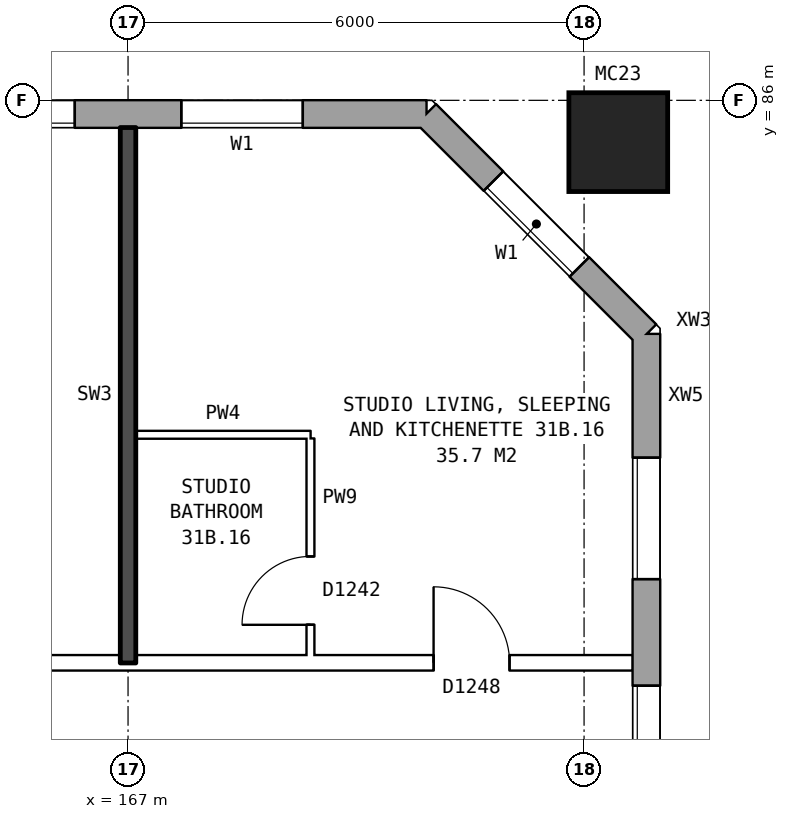
"""IFC4 building model, lengths in metres.
Left out: names, types, materials, properties, quantities, classifications, styles, units other than length and angle.
Written with IfcOpenShell. Run it as: python <this file> out.ifc"""

import sys

from ifc_helpers import new_model, si_unit, direction, frame, frame_2d, origin, origin_2d, place, context, subcontext, project, spatial, rectangle, hollow_rectangle, extrude, element, fill, save


model = new_model("IFC4")
c1 = context("Model", 3, precision=1e-05, world=origin(), true_north=direction((0.0, 1.0)))
c2 = subcontext(c1, "Body", "Model", "MODEL_VIEW")
j1 = project(units=[si_unit("LENGTHUNIT", "METRE"), si_unit("PLANEANGLEUNIT", "RADIAN")], contexts=[c1])
p1 = place(None, origin())
s1 = spatial("IfcSite", under=j1, at=p1, CompositionType="ELEMENT")
p2 = place(p1, origin())
s2 = spatial("IfcBuilding", under=s1, at=p2, CompositionType="ELEMENT")
p3 = place(p2, frame((0.0, 0.0, 111.9)))
s3 = spatial("IfcBuildingStorey", under=s2, at=p3, CompositionType="ELEMENT", Elevation=111.9)
p4 = place(p3, frame((173.45, 85.45, 0.0), z_axis=(0.0, 0.0, 1.0), x_axis=(1.0, 0.0, 0.0)))
e1 = element("IfcColumn", 1, at=p4, inside=s3, PredefinedType="COLUMN", context=c2, shape_type="SweptSolid", body=[
    extrude(hollow_rectangle(XDim=1.3, YDim=1.3, WallThickness=0.07, at=origin_2d()), origin(), (0.0, 0.0, 1.0), 3.1),
])
p5 = place(p3, frame((173.82, 57.075, 0.0), z_axis=(0.0, 0.0, 1.0), x_axis=(0.0, 1.0, 0.0)))
e2 = element("IfcWall", 2, at=p5, inside=s3, PredefinedType="STANDARD", context=c2, shape_type="SweptSolid", body=[
    extrude(rectangle(XDim=25.851, YDim=0.36, at=frame_2d((12.925, 0.0))), origin(), (0.0, 0.0, 1.0), 2.85),
])
p6 = place(p5, frame((1.625, 0.0, 0.8)))
e3 = element("IfcOpeningElement", 3, at=p6, cuts=e2, PredefinedType="OPENING", context=c2, shape_type="SweptSolid", body=[
    extrude(rectangle(XDim=1.6, YDim=1.8, at=frame_2d((0.8, 0.9))), frame((0.0, 0.19, 0.0), z_axis=(0.0, -1.0, 0.0), x_axis=(1.0, 0.0, 0.0)), (0.0, 0.0, 1.0), 0.38),
])
p7 = place(p5, frame((4.625, 0.0, 0.8)))
e4 = element("IfcOpeningElement", 4, at=p7, cuts=e2, PredefinedType="OPENING", context=c2, shape_type="SweptSolid", body=[
    extrude(rectangle(XDim=1.6, YDim=1.8, at=frame_2d((0.8, 0.9))), frame((0.0, 0.19, 0.0), z_axis=(0.0, -1.0, 0.0), x_axis=(1.0, 0.0, 0.0)), (0.0, 0.0, 1.0), 0.38),
])
p8 = place(p5, frame((7.625, 0.0, 0.8)))
e5 = element("IfcOpeningElement", 5, at=p8, cuts=e2, PredefinedType="OPENING", context=c2, shape_type="SweptSolid", body=[
    extrude(rectangle(XDim=1.6, YDim=1.8, at=frame_2d((0.8, 0.9))), frame((0.0, 0.19, 0.0), z_axis=(0.0, -1.0, 0.0), x_axis=(1.0, 0.0, 0.0)), (0.0, 0.0, 1.0), 0.38),
])
p9 = place(p5, frame((10.625, 0.0, 0.8)))
e6 = element("IfcOpeningElement", 6, at=p9, cuts=e2, PredefinedType="OPENING", context=c2, shape_type="SweptSolid", body=[
    extrude(rectangle(XDim=1.6, YDim=1.8, at=frame_2d((0.8, 0.9))), frame((0.0, 0.19, 0.0), z_axis=(0.0, -1.0, 0.0), x_axis=(1.0, 0.0, 0.0)), (0.0, 0.0, 1.0), 0.38),
])
p10 = place(p5, frame((13.625, 0.0, 0.8)))
e7 = element("IfcOpeningElement", 7, at=p10, cuts=e2, PredefinedType="OPENING", context=c2, shape_type="SweptSolid", body=[
    extrude(rectangle(XDim=1.6, YDim=1.8, at=frame_2d((0.8, 0.9))), frame((0.0, 0.19, 0.0), z_axis=(0.0, -1.0, 0.0), x_axis=(1.0, 0.0, 0.0)), (0.0, 0.0, 1.0), 0.38),
])
p11 = place(p5, frame((16.625, 0.0, 0.8)))
e8 = element("IfcOpeningElement", 8, at=p11, cuts=e2, PredefinedType="OPENING", context=c2, shape_type="SweptSolid", body=[
    extrude(rectangle(XDim=1.6, YDim=1.8, at=frame_2d((0.8, 0.9))), frame((0.0, 0.19, 0.0), z_axis=(0.0, -1.0, 0.0), x_axis=(1.0, 0.0, 0.0)), (0.0, 0.0, 1.0), 0.38),
])
p12 = place(p5, frame((19.625, 0.0, 0.8)))
e9 = element("IfcOpeningElement", 9, at=p12, cuts=e2, PredefinedType="OPENING", context=c2, shape_type="SweptSolid", body=[
    extrude(rectangle(XDim=1.6, YDim=1.8, at=frame_2d((0.8, 0.9))), frame((0.0, 0.19, 0.0), z_axis=(0.0, -1.0, 0.0), x_axis=(1.0, 0.0, 0.0)), (0.0, 0.0, 1.0), 0.38),
])
p13 = place(p5, frame((22.625, 0.0, 0.8)))
e10 = element("IfcOpeningElement", 10, at=p13, cuts=e2, PredefinedType="OPENING", context=c2, shape_type="SweptSolid", body=[
    extrude(rectangle(XDim=1.6, YDim=1.8, at=frame_2d((0.8, 0.9))), frame((0.0, 0.19, 0.0), z_axis=(0.0, -1.0, 0.0), x_axis=(1.0, 0.0, 0.0)), (0.0, 0.0, 1.0), 0.38),
])
p14 = place(p3, frame((173.82, 82.925, 0.0), z_axis=(0.0, 0.0, 1.0), x_axis=(-0.707106781187, 0.707106781187, 0.0)))
e11 = element("IfcWall", 11, at=p14, inside=s3, PredefinedType="STANDARD", context=c2, shape_type="SweptSolid", body=[
    extrude(rectangle(XDim=4.094, YDim=0.36, at=frame_2d((2.047, 0.0))), origin(), (0.0, 0.0, 1.0), 2.85),
])
p15 = place(p14, frame((1.247, 0.0, 0.8)))
e12 = element("IfcOpeningElement", 12, at=p15, cuts=e11, PredefinedType="OPENING", context=c2, shape_type="SweptSolid", body=[
    extrude(rectangle(XDim=1.6, YDim=1.8, at=frame_2d((0.8, 0.9))), frame((0.0, 0.19, 0.0), z_axis=(0.0, -1.0, 0.0), x_axis=(1.0, 0.0, 0.0)), (0.0, 0.0, 1.0), 0.38),
])
p16 = place(p3, frame((170.925, 85.82, 0.0), z_axis=(0.0, 0.0, 1.0), x_axis=(-1.0, 0.0, 0.0)))
e13 = element("IfcWall", 13, at=p16, inside=s3, PredefinedType="STANDARD", context=c2, shape_type="SweptSolid", body=[
    extrude(rectangle(XDim=36.851, YDim=0.36, at=frame_2d((18.425, 0.0))), origin(), (0.0, 0.0, 1.0), 2.85),
])
p17 = place(p16, frame((1.625, 0.0, 0.8)))
e14 = element("IfcOpeningElement", 14, at=p17, cuts=e13, PredefinedType="OPENING", context=c2, shape_type="SweptSolid", body=[
    extrude(rectangle(XDim=1.6, YDim=1.8, at=frame_2d((0.8, 0.9))), frame((0.0, 0.19, 0.0), z_axis=(0.0, -1.0, 0.0), x_axis=(1.0, 0.0, 0.0)), (0.0, 0.0, 1.0), 0.38),
])
p18 = place(p16, frame((4.625, 0.0, 0.8)))
e15 = element("IfcOpeningElement", 15, at=p18, cuts=e13, PredefinedType="OPENING", context=c2, shape_type="SweptSolid", body=[
    extrude(rectangle(XDim=1.6, YDim=1.8, at=frame_2d((0.8, 0.9))), frame((0.0, 0.19, 0.0), z_axis=(0.0, -1.0, 0.0), x_axis=(1.0, 0.0, 0.0)), (0.0, 0.0, 1.0), 0.38),
])
p19 = place(p16, frame((7.625, 0.0, 0.8)))
e16 = element("IfcOpeningElement", 16, at=p19, cuts=e13, PredefinedType="OPENING", context=c2, shape_type="SweptSolid", body=[
    extrude(rectangle(XDim=1.6, YDim=1.8, at=frame_2d((0.8, 0.9))), frame((0.0, 0.19, 0.0), z_axis=(0.0, -1.0, 0.0), x_axis=(1.0, 0.0, 0.0)), (0.0, 0.0, 1.0), 0.38),
])
p20 = place(p16, frame((10.625, 0.0, 0.8)))
e17 = element("IfcOpeningElement", 17, at=p20, cuts=e13, PredefinedType="OPENING", context=c2, shape_type="SweptSolid", body=[
    extrude(rectangle(XDim=1.6, YDim=1.8, at=frame_2d((0.8, 0.9))), frame((0.0, 0.19, 0.0), z_axis=(0.0, -1.0, 0.0), x_axis=(1.0, 0.0, 0.0)), (0.0, 0.0, 1.0), 0.38),
])
p21 = place(p16, frame((13.625, 0.0, 0.8)))
e18 = element("IfcOpeningElement", 18, at=p21, cuts=e13, PredefinedType="OPENING", context=c2, shape_type="SweptSolid", body=[
    extrude(rectangle(XDim=1.6, YDim=1.8, at=frame_2d((0.8, 0.9))), frame((0.0, 0.19, 0.0), z_axis=(0.0, -1.0, 0.0), x_axis=(1.0, 0.0, 0.0)), (0.0, 0.0, 1.0), 0.38),
])
p22 = place(p16, frame((17.075, 0.0, 0.15)))
e19 = element("IfcOpeningElement", 19, at=p22, cuts=e13, PredefinedType="OPENING", context=c2, shape_type="SweptSolid", body=[
    extrude(rectangle(XDim=0.6, YDim=0.9, at=frame_2d((0.3, 0.45))), frame((0.0, 0.19, 0.0), z_axis=(0.0, -1.0, 0.0), x_axis=(1.0, 0.0, 0.0)), (0.0, 0.0, 1.0), 0.38),
])
p23 = place(p16, frame((19.075, 0.0, 0.25)))
e20 = element("IfcOpeningElement", 20, at=p23, cuts=e13, PredefinedType="OPENING", context=c2, shape_type="SweptSolid", body=[
    extrude(rectangle(XDim=0.6, YDim=0.9, at=frame_2d((0.3, 0.45))), frame((0.0, 0.19, 0.0), z_axis=(0.0, -1.0, 0.0), x_axis=(1.0, 0.0, 0.0)), (0.0, 0.0, 1.0), 0.38),
])
p24 = place(p16, frame((22.625, 0.0, 0.8)))
e21 = element("IfcOpeningElement", 21, at=p24, cuts=e13, PredefinedType="OPENING", context=c2, shape_type="SweptSolid", body=[
    extrude(rectangle(XDim=1.6, YDim=1.8, at=frame_2d((0.8, 0.9))), frame((0.0, 0.19, 0.0), z_axis=(0.0, -1.0, 0.0), x_axis=(1.0, 0.0, 0.0)), (0.0, 0.0, 1.0), 0.38),
])
p25 = place(p16, frame((25.625, 0.0, 0.8)))
e22 = element("IfcOpeningElement", 22, at=p25, cuts=e13, PredefinedType="OPENING", context=c2, shape_type="SweptSolid", body=[
    extrude(rectangle(XDim=1.6, YDim=1.8, at=frame_2d((0.8, 0.9))), frame((0.0, 0.19, 0.0), z_axis=(0.0, -1.0, 0.0), x_axis=(1.0, 0.0, 0.0)), (0.0, 0.0, 1.0), 0.38),
])
p26 = place(p16, frame((28.625, 0.0, 0.8)))
e23 = element("IfcOpeningElement", 23, at=p26, cuts=e13, PredefinedType="OPENING", context=c2, shape_type="SweptSolid", body=[
    extrude(rectangle(XDim=1.6, YDim=1.8, at=frame_2d((0.8, 0.9))), frame((0.0, 0.19, 0.0), z_axis=(0.0, -1.0, 0.0), x_axis=(1.0, 0.0, 0.0)), (0.0, 0.0, 1.0), 0.38),
])
p27 = place(p16, frame((31.625, 0.0, 0.8)))
e24 = element("IfcOpeningElement", 24, at=p27, cuts=e13, PredefinedType="OPENING", context=c2, shape_type="SweptSolid", body=[
    extrude(rectangle(XDim=1.6, YDim=1.8, at=frame_2d((0.8, 0.9))), frame((0.0, 0.19, 0.0), z_axis=(0.0, -1.0, 0.0), x_axis=(1.0, 0.0, 0.0)), (0.0, 0.0, 1.0), 0.38),
])
p28 = place(p16, frame((34.625, 0.0, 0.8)))
e25 = element("IfcOpeningElement", 25, at=p28, cuts=e13, PredefinedType="OPENING", context=c2, shape_type="SweptSolid", body=[
    extrude(rectangle(XDim=1.6, YDim=1.8, at=frame_2d((0.8, 0.9))), frame((0.0, 0.19, 0.0), z_axis=(0.0, -1.0, 0.0), x_axis=(1.0, 0.0, 0.0)), (0.0, 0.0, 1.0), 0.38),
])
p29 = place(p16, frame((17.975, 0.0, 0.25)))
e26 = element("IfcOpeningElement", 26, at=p29, cuts=e13, PredefinedType="OPENING", context=c2, shape_type="SweptSolid", body=[
    extrude(rectangle(XDim=0.8, YDim=1.5, at=frame_2d((0.4, 0.75))), frame((0.0, 0.19, 0.0), z_axis=(0.0, -1.0, 0.0), x_axis=(1.0, 0.0, 0.0)), (0.0, 0.0, 1.0), 0.38),
])
p30 = place(p16, frame((20.525, 0.0, 1.35)))
e27 = element("IfcOpeningElement", 27, at=p30, cuts=e13, PredefinedType="OPENING", context=c2, shape_type="SweptSolid", body=[
    extrude(rectangle(XDim=1.2, YDim=1.2, at=frame_2d((0.6, 0.6))), frame((0.0, 0.19, 0.0), z_axis=(0.0, -1.0, 0.0), x_axis=(1.0, 0.0, 0.0)), (0.0, 0.0, 1.0), 0.38),
])
p31 = place(p3, frame((155.1, 78.6, 0.0), z_axis=(0.0, 0.0, 1.0), x_axis=(1.0, 0.0, 0.0)))
e28 = element("IfcWall", 28, at=p31, inside=s3, PredefinedType="PARTITIONING", context=c2, shape_type="SweptSolid", body=[
    extrude(rectangle(XDim=18.54, YDim=0.2, at=frame_2d((9.27, 0.0))), origin(), (0.0, 0.0, 1.0), 2.85),
])
p32 = place(p31, frame((1.45, 0.0, 0.0)))
e29 = element("IfcOpeningElement", 29, at=p32, cuts=e28, PredefinedType="OPENING", context=c2, shape_type="SweptSolid", body=[
    extrude(rectangle(XDim=1.0, YDim=2.1, at=frame_2d((0.5, 1.05))), frame((0.0, 0.11, 0.0), z_axis=(0.0, -1.0, 0.0), x_axis=(1.0, 0.0, 0.0)), (0.0, 0.0, 1.0), 0.22),
])
p33 = place(p31, frame((9.6, 0.0, 0.0)))
e30 = element("IfcOpeningElement", 30, at=p33, cuts=e28, PredefinedType="OPENING", context=c2, shape_type="SweptSolid", body=[
    extrude(rectangle(XDim=1.0, YDim=2.1, at=frame_2d((0.5, 1.05))), frame((0.0, 0.11, 0.0), z_axis=(0.0, -1.0, 0.0), x_axis=(1.0, 0.0, 0.0)), (0.0, 0.0, 1.0), 0.22),
])
p34 = place(p31, frame((15.92, 0.0, 0.0)))
e31 = element("IfcOpeningElement", 31, at=p34, cuts=e28, PredefinedType="OPENING", context=c2, shape_type="SweptSolid", body=[
    extrude(rectangle(XDim=1.0, YDim=2.1, at=frame_2d((0.5, 1.05))), frame((0.0, 0.11, 0.0), z_axis=(0.0, -1.0, 0.0), x_axis=(1.0, 0.0, 0.0)), (0.0, 0.0, 1.0), 0.22),
])
p35 = place(p3, frame((167.1, 81.6, 0.0), z_axis=(0.0, 0.0, 1.0), x_axis=(1.0, 0.0, 0.0)))
e32 = element("IfcWall", 32, at=p35, inside=s3, PredefinedType="PARTITIONING", context=c2, shape_type="SweptSolid", body=[
    extrude(rectangle(XDim=2.3, YDim=0.1, at=frame_2d((1.15, 0.0))), origin(), (0.0, 0.0, 1.0), 2.85),
])
p36 = place(p3, frame((167.0, 78.6, 0.0), z_axis=(0.0, 0.0, 1.0), x_axis=(0.0, 1.0, 0.0)))
e33 = element("IfcWall", 33, at=p36, inside=s3, PredefinedType="SOLIDWALL", context=c2, shape_type="SweptSolid", body=[
    extrude(rectangle(XDim=7.04, YDim=0.2, at=frame_2d((3.52, 0.0))), origin(), (0.0, 0.0, 1.0), 2.85),
])
p37 = place(p3, frame((169.4, 78.7, 0.0), z_axis=(0.0, 0.0, 1.0), x_axis=(0.0, 1.0, 0.0)))
e34 = element("IfcWall", 34, at=p37, inside=s3, PredefinedType="PARTITIONING", context=c2, shape_type="SweptSolid", body=[
    extrude(rectangle(XDim=2.85, YDim=0.1, at=frame_2d((1.425, 0.0))), origin(), (0.0, 0.0, 1.0), 2.85),
])
p38 = place(p37, frame((0.4, 0.0, 0.0)))
e35 = element("IfcOpeningElement", 35, at=p38, cuts=e34, PredefinedType="OPENING", context=c2, shape_type="SweptSolid", body=[
    extrude(rectangle(XDim=0.9, YDim=2.1, at=frame_2d((0.45, 1.05))), frame((0.0, 0.06, 0.0), z_axis=(0.0, -1.0, 0.0), x_axis=(1.0, 0.0, 0.0)), (0.0, 0.0, 1.0), 0.12),
])
p39 = place(p12, origin())
e36 = element("IfcWindow", 36, at=p39, inside=s3, PartitioningType="SINGLE_PANEL", PredefinedType="WINDOW", context=c2, shape_type="SweptSolid", body=[
    extrude(rectangle(XDim=1.6, YDim=1.8, at=frame_2d((0.8, 0.9))), frame((0.0, 0.15, 0.0), z_axis=(0.0, -1.0, 0.0), x_axis=(1.0, 0.0, 0.0)), (0.0, 0.0, 1.0), 0.06),
])
fill(e9, e36)
p40 = place(p13, origin())
e37 = element("IfcWindow", 37, at=p40, inside=s3, PartitioningType="SINGLE_PANEL", PredefinedType="WINDOW", context=c2, shape_type="SweptSolid", body=[
    extrude(rectangle(XDim=1.6, YDim=1.8, at=frame_2d((0.8, 0.9))), frame((0.0, 0.15, 0.0), z_axis=(0.0, -1.0, 0.0), x_axis=(1.0, 0.0, 0.0)), (0.0, 0.0, 1.0), 0.06),
])
fill(e10, e37)
p41 = place(p15, origin())
e38 = element("IfcWindow", 38, at=p41, inside=s3, PartitioningType="SINGLE_PANEL", PredefinedType="WINDOW", context=c2, shape_type="SweptSolid", body=[
    extrude(rectangle(XDim=1.6, YDim=1.8, at=frame_2d((0.8, 0.9))), frame((0.0, 0.15, 0.0), z_axis=(0.0, -1.0, 0.0), x_axis=(1.0, 0.0, 0.0)), (0.0, 0.0, 1.0), 0.06),
])
fill(e12, e38)
p42 = place(p17, origin())
e39 = element("IfcWindow", 39, at=p42, inside=s3, PartitioningType="SINGLE_PANEL", PredefinedType="WINDOW", context=c2, shape_type="SweptSolid", body=[
    extrude(rectangle(XDim=1.6, YDim=1.8, at=frame_2d((0.8, 0.9))), frame((0.0, 0.15, 0.0), z_axis=(0.0, -1.0, 0.0), x_axis=(1.0, 0.0, 0.0)), (0.0, 0.0, 1.0), 0.06),
])
fill(e14, e39)
p43 = place(p18, origin())
e40 = element("IfcWindow", 40, at=p43, inside=s3, PartitioningType="SINGLE_PANEL", PredefinedType="WINDOW", context=c2, shape_type="SweptSolid", body=[
    extrude(rectangle(XDim=1.6, YDim=1.8, at=frame_2d((0.8, 0.9))), frame((0.0, 0.15, 0.0), z_axis=(0.0, -1.0, 0.0), x_axis=(1.0, 0.0, 0.0)), (0.0, 0.0, 1.0), 0.06),
])
fill(e15, e40)
p44 = place(p34, origin())
e41 = element("IfcDoor", 41, at=p44, inside=s3, OperationType="SINGLE_SWING_LEFT", PredefinedType="DOOR", context=c2, shape_type="SweptSolid", body=[
    extrude(rectangle(XDim=1.0, YDim=2.1, at=frame_2d((0.5, 1.05))), frame((0.0, 0.025, 0.0), z_axis=(0.0, -1.0, 0.0), x_axis=(1.0, 0.0, 0.0)), (0.0, 0.0, 1.0), 0.05),
])
fill(e31, e41)
p45 = place(p38, origin())
e42 = element("IfcDoor", 42, at=p45, inside=s3, OperationType="SINGLE_SWING_LEFT", PredefinedType="DOOR", context=c2, shape_type="SweptSolid", body=[
    extrude(rectangle(XDim=0.9, YDim=2.1, at=frame_2d((0.45, 1.05))), frame((0.0, 0.025, 0.0), z_axis=(0.0, -1.0, 0.0), x_axis=(1.0, 0.0, 0.0)), (0.0, 0.0, 1.0), 0.05),
])
fill(e35, e42)
save(model, sys.argv[1])
